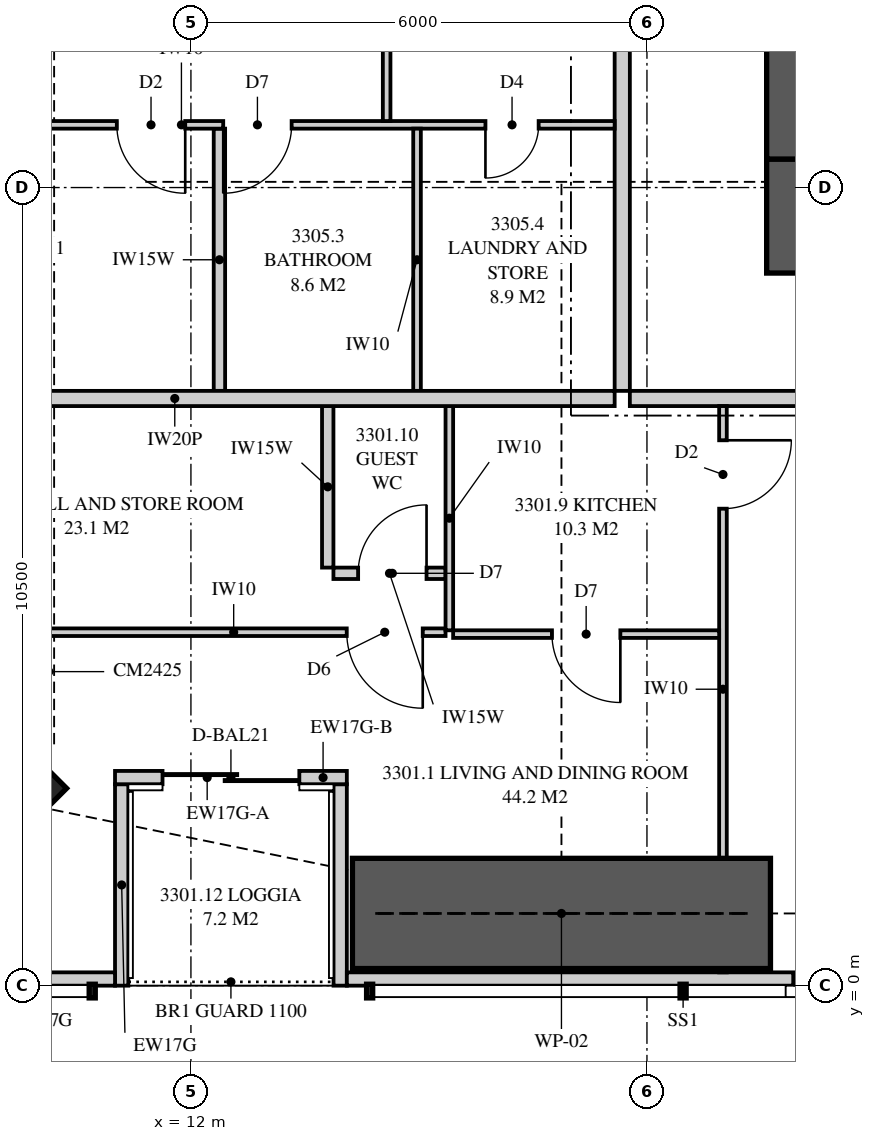
"""IFC4 building model, lengths in metres.
Left out: names, types, materials, properties, quantities, classifications, styles, units other than length and angle.
Written with IfcOpenShell. Run it as: python <this file> out.ifc"""

import sys

from ifc_helpers import new_model, si_unit, direction, frame, frame_2d, origin, origin_2d, place, context, subcontext, project, spatial, polyline, rectangle, outline, extrude, element, fill, save


model = new_model("IFC4")
c1 = context("Model", 3, precision=1e-05, world=origin(), true_north=direction((0.0, 1.0)))
c2 = subcontext(c1, "Body", "Model", "MODEL_VIEW")
j1 = project(units=[si_unit("LENGTHUNIT", "METRE"), si_unit("PLANEANGLEUNIT", "RADIAN")], contexts=[c1])
p1 = place(None, origin())
s1 = spatial("IfcSite", under=j1, at=p1, CompositionType="ELEMENT")
p2 = place(p1, origin())
s2 = spatial("IfcBuilding", under=s1, at=p2, CompositionType="ELEMENT")
p3 = place(p2, frame((0.0, 0.0, 121.6)))
s3 = spatial("IfcBuildingStorey", under=s2, at=p3, CompositionType="ELEMENT", Elevation=121.6)
p4 = place(p3, frame((8.631, 2.631, 0.0), z_axis=(0.0, 0.0, 1.0), x_axis=(0.707106781187, 0.707106781187, 0.0)))
e1 = element("IfcColumn", 1, at=p4, inside=s3, PredefinedType="COLUMN", context=c2, shape_type="SweptSolid", body=[
    extrude(rectangle(XDim=2.4, YDim=2.5, at=origin_2d()), origin(), (0.0, 0.0, 1.0), 3.35),
])
p5 = place(p3, frame((19.575, 10.125, 0.0), z_axis=(0.0, 0.0, 1.0), x_axis=(1.0, 0.0, 0.0)))
e2 = element("IfcWall", 2, at=p5, inside=s3, PredefinedType="SHEAR", context=c2, shape_type="SweptSolid", body=[
    extrude(rectangle(XDim=6.425, YDim=1.5, at=frame_2d((3.212, 0.0))), origin(), (0.0, 0.0, 1.0), 3.35),
])
p6 = place(p5, frame((4.85, 0.0, 0.0)))
e3 = element("IfcOpeningElement", 3, at=p6, cuts=e2, PredefinedType="OPENING", context=c2, shape_type="SweptSolid", body=[
    extrude(rectangle(XDim=0.75, YDim=2.1, at=frame_2d((0.375, 1.05))), frame((0.0, 0.76, 0.0), z_axis=(0.0, -1.0, 0.0), x_axis=(1.0, 0.0, 0.0)), (0.0, 0.0, 1.0), 1.52),
])
p7 = place(p3, frame((20.0, 13.0, 0.0), z_axis=(0.0, 0.0, 1.0), x_axis=(0.0, -1.0, 0.0)))
e4 = element("IfcWall", 4, at=p7, inside=s3, PredefinedType="SHEAR", context=c2, shape_type="SweptSolid", body=[
    extrude(rectangle(XDim=2.125, YDim=0.85, at=frame_2d((1.062, 0.0))), origin(), (0.0, 0.0, 1.0), 3.35),
])
p8 = place(p3, frame((9.051, 0.087, 0.0), z_axis=(0.0, 0.0, 1.0), x_axis=(1.0, 0.0, 0.0)))
e5 = element("IfcWall", 5, at=p8, inside=s3, PredefinedType="SOLIDWALL", context=c2, shape_type="SweptSolid", body=[
    extrude(rectangle(XDim=1.95, YDim=0.175, at=frame_2d((0.975, 0.0))), origin(), (0.0, 0.0, 1.0), 3.11),
])
p9 = place(p3, frame((14.051, 0.087, 0.0), z_axis=(0.0, 0.0, 1.0), x_axis=(1.0, 0.0, 0.0)))
e6 = element("IfcWall", 6, at=p9, inside=s3, PredefinedType="SOLIDWALL", context=c2, shape_type="SweptSolid", body=[
    extrude(outline(polyline([(0.0, 0.0), (27.374, 0.0), (27.374, 3.11), (24.777, 3.11), (24.777, 2.15), (24.732, 2.15), (24.732, 3.11), (24.574, 3.11), (24.574, 2.15), (2.824, 2.15), (2.824, 3.11), (2.666, 3.11), (2.666, 2.15), (2.62, 2.15), (2.62, 3.11), (0.0, 3.11), (0.0, 0.0)])), frame((0.0, 0.087, 0.0), z_axis=(0.0, -1.0, 0.0), x_axis=(1.0, 0.0, 0.0)), (0.0, 0.0, 1.0), 0.175),
])
p10 = place(p9, frame((5.874, 0.0, 0.4)))
e7 = element("IfcOpeningElement", 7, at=p10, cuts=e6, PredefinedType="OPENING", context=c2, shape_type="SweptSolid", body=[
    extrude(rectangle(XDim=1.8, YDim=1.7, at=frame_2d((0.9, 0.85))), frame((0.0, 0.097, 0.0), z_axis=(0.0, -1.0, 0.0), x_axis=(1.0, 0.0, 0.0)), (0.0, 0.0, 1.0), 0.195),
])
p11 = place(p9, frame((9.04, 0.0, 0.4)))
e8 = element("IfcOpeningElement", 8, at=p11, cuts=e6, PredefinedType="OPENING", context=c2, shape_type="SweptSolid", body=[
    extrude(rectangle(XDim=1.8, YDim=1.7, at=frame_2d((0.9, 0.85))), frame((0.0, 0.097, 0.0), z_axis=(0.0, -1.0, 0.0), x_axis=(1.0, 0.0, 0.0)), (0.0, 0.0, 1.0), 0.195),
])
p12 = place(p9, frame((16.564, 0.0, 0.4)))
e9 = element("IfcOpeningElement", 9, at=p12, cuts=e6, PredefinedType="OPENING", context=c2, shape_type="SweptSolid", body=[
    extrude(rectangle(XDim=1.8, YDim=1.7, at=frame_2d((0.9, 0.85))), frame((0.0, 0.097, 0.0), z_axis=(0.0, -1.0, 0.0), x_axis=(1.0, 0.0, 0.0)), (0.0, 0.0, 1.0), 0.195),
])
p13 = place(p9, frame((19.889, 0.0, 0.4)))
e10 = element("IfcOpeningElement", 10, at=p13, cuts=e6, PredefinedType="OPENING", context=c2, shape_type="SweptSolid", body=[
    extrude(rectangle(XDim=1.8, YDim=1.7, at=frame_2d((0.9, 0.85))), frame((0.0, 0.097, 0.0), z_axis=(0.0, -1.0, 0.0), x_axis=(1.0, 0.0, 0.0)), (0.0, 0.0, 1.0), 0.195),
])
p14 = place(p3, frame((11.001, 2.738, 0.0), z_axis=(0.0, 0.0, 1.0), x_axis=(1.0, 0.0, 0.0)))
e11 = element("IfcWall", 11, at=p14, inside=s3, PredefinedType="SOLIDWALL", context=c2, shape_type="SweptSolid", body=[
    extrude(rectangle(XDim=2.425, YDim=0.175, at=frame_2d((1.212, 0.0))), origin(), (0.0, 0.0, 1.0), 2.15),
])
p15 = place(p14, frame((0.625, 0.0, 0.0)))
e12 = element("IfcOpeningElement", 12, at=p15, cuts=e11, PredefinedType="OPENING", context=c2, shape_type="SweptSolid", body=[
    extrude(rectangle(XDim=1.8, YDim=2.1, at=frame_2d((0.9, 1.05))), frame((0.0, 0.097, 0.0), z_axis=(0.0, -1.0, 0.0), x_axis=(1.0, 0.0, 0.0)), (0.0, 0.0, 1.0), 0.195),
])
p16 = place(p3, frame((13.426, 2.738, 0.0), z_axis=(0.0, 0.0, 1.0), x_axis=(1.0, 0.0, 0.0)))
e13 = element("IfcWall", 13, at=p16, inside=s3, PredefinedType="SOLIDWALL", context=c2, shape_type="SweptSolid", body=[
    extrude(rectangle(XDim=0.625, YDim=0.175, at=frame_2d((0.312, 0.0))), origin(), (0.0, 0.0, 1.0), 3.11),
])
p17 = place(p3, frame((11.089, 0.0, 0.0), z_axis=(0.0, 0.0, 1.0), x_axis=(0.0, 1.0, 0.0)))
e14 = element("IfcWall", 14, at=p17, inside=s3, PredefinedType="SOLIDWALL", context=c2, shape_type="SweptSolid", body=[
    extrude(outline(polyline([(0.0, 0.0), (2.65, 0.0), (2.65, 2.15), (1.296, 2.15), (1.296, 3.11), (0.0, 3.11), (0.0, 0.0)])), frame((0.0, 0.087, 0.0), z_axis=(0.0, -1.0, 0.0), x_axis=(1.0, 0.0, 0.0)), (0.0, 0.0, 1.0), 0.175),
])
p18 = place(p3, frame((13.964, 0.0, 0.0), z_axis=(0.0, 0.0, 1.0), x_axis=(0.0, 1.0, 0.0)))
e15 = element("IfcWall", 15, at=p18, inside=s3, PredefinedType="SOLIDWALL", context=c2, shape_type="SweptSolid", body=[
    extrude(outline(polyline([(0.0, 0.0), (2.65, 0.0), (2.65, 3.11), (2.378, 3.11), (2.378, 2.15), (0.709, 2.15), (0.709, 3.11), (0.0, 3.11), (0.0, 0.0)])), frame((0.0, 0.087, 0.0), z_axis=(0.0, -1.0, 0.0), x_axis=(1.0, 0.0, 0.0)), (0.0, 0.0, 1.0), 0.175),
])
p19 = place(p3, frame((17.775, 7.725, 0.0), z_axis=(0.0, 0.0, 1.0), x_axis=(1.0, 0.0, 0.0)))
e16 = element("IfcWall", 16, at=p19, inside=s3, PredefinedType="PARTITIONING", context=c2, shape_type="SweptSolid", body=[
    extrude(outline(polyline([(0.0, 0.0), (19.225, 0.0), (19.225, 3.11), (10.312, 3.11), (10.312, 2.541), (9.638, 2.541), (9.638, 3.11), (0.0, 3.11), (0.0, 0.0)])), frame((0.0, 0.1, 0.0), z_axis=(0.0, -1.0, 0.0), x_axis=(1.0, 0.0, 0.0)), (0.0, 0.0, 1.0), 0.2),
])
p20 = place(p19, frame((3.275, 0.0, 0.0)))
e17 = element("IfcOpeningElement", 17, at=p20, cuts=e16, PredefinedType="OPENING", context=c2, shape_type="SweptSolid", body=[
    extrude(rectangle(XDim=1.05, YDim=2.2, at=frame_2d((0.525, 1.1))), frame((0.0, 0.11, 0.0), z_axis=(0.0, -1.0, 0.0), x_axis=(1.0, 0.0, 0.0)), (0.0, 0.0, 1.0), 0.22),
])
p21 = place(p3, frame((19.0, 0.175, 0.0), z_axis=(0.0, 0.0, 1.0), x_axis=(0.0, 1.0, 0.0)))
e18 = element("IfcWall", 18, at=p21, inside=s3, PredefinedType="PARTITIONING", context=c2, shape_type="SweptSolid", body=[
    extrude(outline(polyline([(0.529, 2.15), (0.0, 2.15), (0.0, 0.0), (0.529, 0.0), (0.529, 0.017), (1.021, 0.017), (1.021, 0.0), (7.45, 0.0), (7.45, 3.11), (1.635, 3.11), (1.635, 2.15), (1.021, 2.15), (1.021, 2.133), (0.529, 2.133), (0.529, 2.15)])), frame((0.0, 0.05, 0.0), z_axis=(0.0, -1.0, 0.0), x_axis=(1.0, 0.0, 0.0)), (0.0, 0.0, 1.0), 0.1),
])
p22 = place(p21, frame((6.1, 0.0, 0.0)))
e19 = element("IfcOpeningElement", 19, at=p22, cuts=e18, PredefinedType="OPENING", context=c2, shape_type="SweptSolid", body=[
    extrude(rectangle(XDim=0.9, YDim=2.1, at=frame_2d((0.45, 1.05))), frame((0.0, 0.06, 0.0), z_axis=(0.0, -1.0, 0.0), x_axis=(1.0, 0.0, 0.0)), (0.0, 0.0, 1.0), 0.12),
])
p23 = place(p3, frame((15.45, 4.625, 0.0), z_axis=(0.0, 0.0, 1.0), x_axis=(1.0, 0.0, 0.0)))
e20 = element("IfcWall", 20, at=p23, inside=s3, PredefinedType="PARTITIONING", context=c2, shape_type="SweptSolid", body=[
    extrude(outline(polyline([(0.0, 0.0), (3.5, 0.0), (3.5, 3.11), (1.712, 3.11), (1.712, 2.541), (1.138, 2.541), (1.138, 3.11), (0.0, 3.11), (0.0, 0.0)])), frame((0.0, 0.05, 0.0), z_axis=(0.0, -1.0, 0.0), x_axis=(1.0, 0.0, 0.0)), (0.0, 0.0, 1.0), 0.1),
])
p24 = place(p23, frame((1.3, 0.0, 0.0)))
e21 = element("IfcOpeningElement", 21, at=p24, cuts=e20, PredefinedType="OPENING", context=c2, shape_type="SweptSolid", body=[
    extrude(rectangle(XDim=0.9, YDim=2.1, at=frame_2d((0.45, 1.05))), frame((0.0, 0.06, 0.0), z_axis=(0.0, -1.0, 0.0), x_axis=(1.0, 0.0, 0.0)), (0.0, 0.0, 1.0), 0.12),
])
p25 = place(p3, frame((15.4, 4.675, 0.0), z_axis=(0.0, 0.0, 1.0), x_axis=(0.0, 1.0, 0.0)))
e22 = element("IfcWall", 22, at=p25, inside=s3, PredefinedType="PARTITIONING", context=c2, shape_type="SweptSolid", body=[
    extrude(rectangle(XDim=2.95, YDim=0.1, at=frame_2d((1.475, 0.0))), origin(), (0.0, 0.0, 1.0), 3.11),
])
p26 = place(p3, frame((13.875, 5.425, 0.0), z_axis=(0.0, 0.0, 1.0), x_axis=(1.0, 0.0, 0.0)))
e23 = element("IfcWall", 23, at=p26, inside=s3, PredefinedType="PLUMBINGWALL", context=c2, shape_type="SweptSolid", body=[
    extrude(rectangle(XDim=1.475, YDim=0.15, at=frame_2d((0.738, 0.0))), origin(), (0.0, 0.0, 1.0), 3.11),
])
p27 = place(p26, frame((0.325, 0.0, 0.0)))
e24 = element("IfcOpeningElement", 24, at=p27, cuts=e23, PredefinedType="OPENING", context=c2, shape_type="SweptSolid", body=[
    extrude(rectangle(XDim=0.9, YDim=2.1, at=frame_2d((0.45, 1.05))), frame((0.0, 0.085, 0.0), z_axis=(0.0, -1.0, 0.0), x_axis=(1.0, 0.0, 0.0)), (0.0, 0.0, 1.0), 0.17),
])
p28 = place(p3, frame((13.8, 5.5, 0.0), z_axis=(0.0, 0.0, 1.0), x_axis=(0.0, 1.0, 0.0)))
e25 = element("IfcWall", 25, at=p28, inside=s3, PredefinedType="PLUMBINGWALL", context=c2, shape_type="SweptSolid", body=[
    extrude(rectangle(XDim=2.125, YDim=0.15, at=frame_2d((1.062, 0.0))), origin(), (0.0, 0.0, 1.0), 3.11),
])
p29 = place(p3, frame((6.175, 4.65, 0.0), z_axis=(0.0, 0.0, 1.0), x_axis=(1.0, 0.0, 0.0)))
e26 = element("IfcWall", 26, at=p29, inside=s3, PredefinedType="PARTITIONING", context=c2, shape_type="SweptSolid", body=[
    extrude(outline(polyline([(0.0, 0.0), (9.175, 0.0), (9.175, 3.11), (5.285, 3.11), (5.285, 2.51), (3.0, 2.51), (3.0, 2.15), (1.258, 2.15), (1.258, 3.11), (0.0, 3.11), (0.0, 0.0)])), frame((0.0, 0.05, 0.0), z_axis=(0.0, -1.0, 0.0), x_axis=(1.0, 0.0, 0.0)), (0.0, 0.0, 1.0), 0.1),
])
p30 = place(p29, frame((7.875, 0.0, 0.0)))
e27 = element("IfcOpeningElement", 27, at=p30, cuts=e26, PredefinedType="OPENING", context=c2, shape_type="SweptSolid", body=[
    extrude(rectangle(XDim=1.0, YDim=2.1, at=frame_2d((0.5, 1.05))), frame((0.0, 0.06, 0.0), z_axis=(0.0, -1.0, 0.0), x_axis=(1.0, 0.0, 0.0)), (0.0, 0.0, 1.0), 0.12),
])
p31 = place(p3, frame((6.0, 7.725, 0.0), z_axis=(0.0, 0.0, 1.0), x_axis=(1.0, 0.0, 0.0)))
e28 = element("IfcWall", 28, at=p31, inside=s3, PredefinedType="PARTITIONING", context=c2, shape_type="SweptSolid", body=[
    extrude(outline(polyline([(0.0, 0.0), (11.575, 0.0), (11.575, 3.11), (11.212, 3.11), (11.212, 2.541), (10.538, 2.541), (10.538, 3.11), (5.51, 3.11), (5.51, 2.51), (2.969, 2.51), (2.969, 2.541), (2.727, 2.541), (2.727, 2.15), (0.884, 2.15), (0.884, 3.11), (0.0, 3.11), (0.0, 0.0)])), frame((0.0, 0.1, 0.0), z_axis=(0.0, -1.0, 0.0), x_axis=(1.0, 0.0, 0.0)), (0.0, 0.0, 1.0), 0.2),
])
p32 = place(p3, frame((17.675, 7.825, 0.0), z_axis=(0.0, 0.0, 1.0), x_axis=(0.0, 1.0, 0.0)))
e29 = element("IfcWall", 29, at=p32, inside=s3, PredefinedType="PARTITIONING", context=c2, shape_type="SweptSolid", body=[
    extrude(outline(polyline([(0.0, 0.0), (9.075, 0.0), (9.075, 3.11), (3.087, 3.11), (3.087, 2.541), (2.413, 2.541), (2.413, 3.11), (0.0, 3.11), (0.0, 0.0)])), frame((0.0, 0.1, 0.0), z_axis=(0.0, -1.0, 0.0), x_axis=(1.0, 0.0, 0.0)), (0.0, 0.0, 1.0), 0.2),
])
p33 = place(p3, frame((6.175, 11.325, 0.0), z_axis=(0.0, 0.0, 1.0), x_axis=(1.0, 0.0, 0.0)))
e30 = element("IfcWall", 30, at=p33, inside=s3, PredefinedType="PARTITIONING", context=c2, shape_type="SweptSolid", body=[
    extrude(outline(polyline([(0.175, 3.11), (0.0, 3.11), (0.0, 0.0), (0.529, 0.0), (0.529, 0.325), (1.021, 0.325), (1.021, 0.0), (11.4, 0.0), (11.4, 3.11), (5.285, 3.11), (5.285, 2.51), (2.765, 2.51), (2.765, 3.11), (2.744, 3.11), (2.744, 2.541), (2.169, 2.541), (2.169, 3.11), (1.918, 3.11), (1.918, 2.15), (1.021, 2.15), (1.021, 1.825), (0.529, 1.825), (0.529, 2.15), (0.175, 2.15), (0.175, 3.11)])), frame((0.0, 0.05, 0.0), z_axis=(0.0, -1.0, 0.0), x_axis=(1.0, 0.0, 0.0)), (0.0, 0.0, 1.0), 0.1),
])
p34 = place(p33, frame((4.85, 0.0, 0.0)))
e31 = element("IfcOpeningElement", 31, at=p34, cuts=e30, PredefinedType="OPENING", context=c2, shape_type="SweptSolid", body=[
    extrude(rectangle(XDim=0.9, YDim=2.1, at=frame_2d((0.45, 1.05))), frame((0.0, 0.06, 0.0), z_axis=(0.0, -1.0, 0.0), x_axis=(1.0, 0.0, 0.0)), (0.0, 0.0, 1.0), 0.12),
])
p35 = place(p33, frame((6.25, 0.0, 0.0)))
e32 = element("IfcOpeningElement", 32, at=p35, cuts=e30, PredefinedType="OPENING", context=c2, shape_type="SweptSolid", body=[
    extrude(rectangle(XDim=0.9, YDim=2.1, at=frame_2d((0.45, 1.05))), frame((0.0, 0.06, 0.0), z_axis=(0.0, -1.0, 0.0), x_axis=(1.0, 0.0, 0.0)), (0.0, 0.0, 1.0), 0.12),
])
p36 = place(p33, frame((9.7, 0.0, 0.0)))
e33 = element("IfcOpeningElement", 33, at=p36, cuts=e30, PredefinedType="OPENING", context=c2, shape_type="SweptSolid", body=[
    extrude(rectangle(XDim=0.7, YDim=2.1, at=frame_2d((0.35, 1.05))), frame((0.0, 0.06, 0.0), z_axis=(0.0, -1.0, 0.0), x_axis=(1.0, 0.0, 0.0)), (0.0, 0.0, 1.0), 0.12),
])
p37 = place(p3, frame((12.375, 7.825, 0.0), z_axis=(0.0, 0.0, 1.0), x_axis=(0.0, 1.0, 0.0)))
e34 = element("IfcWall", 34, at=p37, inside=s3, PredefinedType="PLUMBINGWALL", context=c2, shape_type="SweptSolid", body=[
    extrude(outline(polyline([(0.0, 0.0), (3.45, 0.0), (3.45, 3.11), (3.062, 3.11), (3.062, 2.541), (2.438, 2.541), (2.438, 3.11), (0.0, 3.11), (0.0, 0.0)])), frame((0.0, 0.075, 0.0), z_axis=(0.0, -1.0, 0.0), x_axis=(1.0, 0.0, 0.0)), (0.0, 0.0, 1.0), 0.15),
])
p38 = place(p3, frame((14.975, 7.825, 0.0), z_axis=(0.0, 0.0, 1.0), x_axis=(0.0, 1.0, 0.0)))
e35 = element("IfcWall", 35, at=p38, inside=s3, PredefinedType="PARTITIONING", context=c2, shape_type="SweptSolid", body=[
    extrude(outline(polyline([(0.0, 0.0), (3.45, 0.0), (3.45, 3.11), (3.037, 3.11), (3.037, 2.541), (2.463, 2.541), (2.463, 3.11), (0.0, 3.11), (0.0, 0.0)])), frame((0.0, 0.05, 0.0), z_axis=(0.0, -1.0, 0.0), x_axis=(1.0, 0.0, 0.0)), (0.0, 0.0, 1.0), 0.1),
])
p39 = place(p3, frame((14.575, 11.375, 0.0), z_axis=(0.0, 0.0, 1.0), x_axis=(0.0, 1.0, 0.0)))
e36 = element("IfcWall", 36, at=p39, inside=s3, PredefinedType="PARTITIONING", context=c2, shape_type="SweptSolid", body=[
    extrude(rectangle(XDim=3.55, YDim=0.1, at=frame_2d((1.775, 0.0))), origin(), (0.0, 0.0, 1.0), 3.11),
])
p40 = place(p39, frame((1.35, 0.0, 0.0)))
e37 = element("IfcOpeningElement", 37, at=p40, cuts=e36, PredefinedType="OPENING", context=c2, shape_type="SweptSolid", body=[
    extrude(rectangle(XDim=0.9, YDim=2.1, at=frame_2d((0.45, 1.05))), frame((0.0, 0.06, 0.0), z_axis=(0.0, -1.0, 0.0), x_axis=(1.0, 0.0, 0.0)), (0.0, 0.0, 1.0), 0.12),
])
p41 = place(p3, frame((14.125, 0.95, 0.0), z_axis=(0.0, 0.0, 1.0), x_axis=(1.0, 0.0, 0.0)))
e38 = element("IfcWall", 38, at=p41, inside=s3, PredefinedType="SHEAR", context=c2, shape_type="SweptSolid", body=[
    extrude(rectangle(XDim=5.5, YDim=1.45, at=frame_2d((2.75, 0.0))), origin(), (0.0, 0.0, 1.0), 3.35),
])
p42 = place(p15, origin())
e39 = element("IfcDoor", 39, at=p42, inside=s3, OperationType="SLIDING_TO_LEFT", PredefinedType="DOOR", context=c2, shape_type="SweptSolid", body=[
    extrude(rectangle(XDim=1.8, YDim=2.1, at=frame_2d((0.9, 1.05))), frame((0.0, 0.025, 0.0), z_axis=(0.0, -1.0, 0.0), x_axis=(1.0, 0.0, 0.0)), (0.0, 0.0, 1.0), 0.05),
])
fill(e12, e39)
p43 = place(p10, origin())
e40 = element("IfcWindow", 40, at=p43, inside=s3, PartitioningType="SINGLE_PANEL", PredefinedType="WINDOW", context=c2, shape_type="SweptSolid", body=[
    extrude(rectangle(XDim=1.8, YDim=1.7, at=frame_2d((0.9, 0.85))), frame((0.0, 0.03, 0.0), z_axis=(0.0, -1.0, 0.0), x_axis=(1.0, 0.0, 0.0)), (0.0, 0.0, 1.0), 0.06),
])
fill(e7, e40)
p44 = place(p22, frame((0.9, 0.0, 0.0), z_axis=(0.0, 0.0, 1.0), x_axis=(-1.0, 0.0, 0.0)))
e41 = element("IfcDoor", 41, at=p44, inside=s3, OperationType="SINGLE_SWING_LEFT", PredefinedType="DOOR", context=c2, shape_type="SweptSolid", body=[
    extrude(rectangle(XDim=0.9, YDim=2.1, at=frame_2d((0.45, 1.05))), frame((0.0, 0.025, 0.0), z_axis=(0.0, -1.0, 0.0), x_axis=(1.0, 0.0, 0.0)), (0.0, 0.0, 1.0), 0.05),
])
fill(e19, e41)
p45 = place(p24, frame((0.9, 0.0, 0.0), z_axis=(0.0, 0.0, 1.0), x_axis=(-1.0, 0.0, 0.0)))
e42 = element("IfcDoor", 42, at=p45, inside=s3, OperationType="SINGLE_SWING_LEFT", PredefinedType="DOOR", context=c2, shape_type="SweptSolid", body=[
    extrude(rectangle(XDim=0.9, YDim=2.1, at=frame_2d((0.45, 1.05))), frame((0.0, 0.025, 0.0), z_axis=(0.0, -1.0, 0.0), x_axis=(1.0, 0.0, 0.0)), (0.0, 0.0, 1.0), 0.05),
])
fill(e21, e42)
p46 = place(p27, origin())
e43 = element("IfcDoor", 43, at=p46, inside=s3, OperationType="SINGLE_SWING_RIGHT", PredefinedType="DOOR", context=c2, shape_type="SweptSolid", body=[
    extrude(rectangle(XDim=0.9, YDim=2.1, at=frame_2d((0.45, 1.05))), frame((0.0, 0.025, 0.0), z_axis=(0.0, -1.0, 0.0), x_axis=(1.0, 0.0, 0.0)), (0.0, 0.0, 1.0), 0.05),
])
fill(e24, e43)
p47 = place(p30, frame((1.0, 0.0, 0.0), z_axis=(0.0, 0.0, 1.0), x_axis=(-1.0, 0.0, 0.0)))
e44 = element("IfcDoor", 44, at=p47, inside=s3, OperationType="SINGLE_SWING_LEFT", PredefinedType="DOOR", context=c2, shape_type="SweptSolid", body=[
    extrude(rectangle(XDim=1.0, YDim=2.1, at=frame_2d((0.5, 1.05))), frame((0.0, 0.025, 0.0), z_axis=(0.0, -1.0, 0.0), x_axis=(1.0, 0.0, 0.0)), (0.0, 0.0, 1.0), 0.05),
])
fill(e27, e44)
p48 = place(p34, frame((0.9, 0.0, 0.0), z_axis=(0.0, 0.0, 1.0), x_axis=(-1.0, 0.0, 0.0)))
e45 = element("IfcDoor", 45, at=p48, inside=s3, OperationType="SINGLE_SWING_LEFT", PredefinedType="DOOR", context=c2, shape_type="SweptSolid", body=[
    extrude(rectangle(XDim=0.9, YDim=2.1, at=frame_2d((0.45, 1.05))), frame((0.0, 0.025, 0.0), z_axis=(0.0, -1.0, 0.0), x_axis=(1.0, 0.0, 0.0)), (0.0, 0.0, 1.0), 0.05),
])
fill(e31, e45)
p49 = place(p35, frame((0.9, 0.0, 0.0), z_axis=(0.0, 0.0, 1.0), x_axis=(-1.0, 0.0, 0.0)))
e46 = element("IfcDoor", 46, at=p49, inside=s3, OperationType="SINGLE_SWING_RIGHT", PredefinedType="DOOR", context=c2, shape_type="SweptSolid", body=[
    extrude(rectangle(XDim=0.9, YDim=2.1, at=frame_2d((0.45, 1.05))), frame((0.0, 0.025, 0.0), z_axis=(0.0, -1.0, 0.0), x_axis=(1.0, 0.0, 0.0)), (0.0, 0.0, 1.0), 0.05),
])
fill(e32, e46)
p50 = place(p36, frame((0.7, 0.0, 0.0), z_axis=(0.0, 0.0, 1.0), x_axis=(-1.0, 0.0, 0.0)))
e47 = element("IfcDoor", 47, at=p50, inside=s3, OperationType="SINGLE_SWING_RIGHT", PredefinedType="DOOR", context=c2, shape_type="SweptSolid", body=[
    extrude(rectangle(XDim=0.7, YDim=2.1, at=frame_2d((0.35, 1.05))), frame((0.0, 0.025, 0.0), z_axis=(0.0, -1.0, 0.0), x_axis=(1.0, 0.0, 0.0)), (0.0, 0.0, 1.0), 0.05),
])
fill(e33, e47)
save(model, sys.argv[1])
